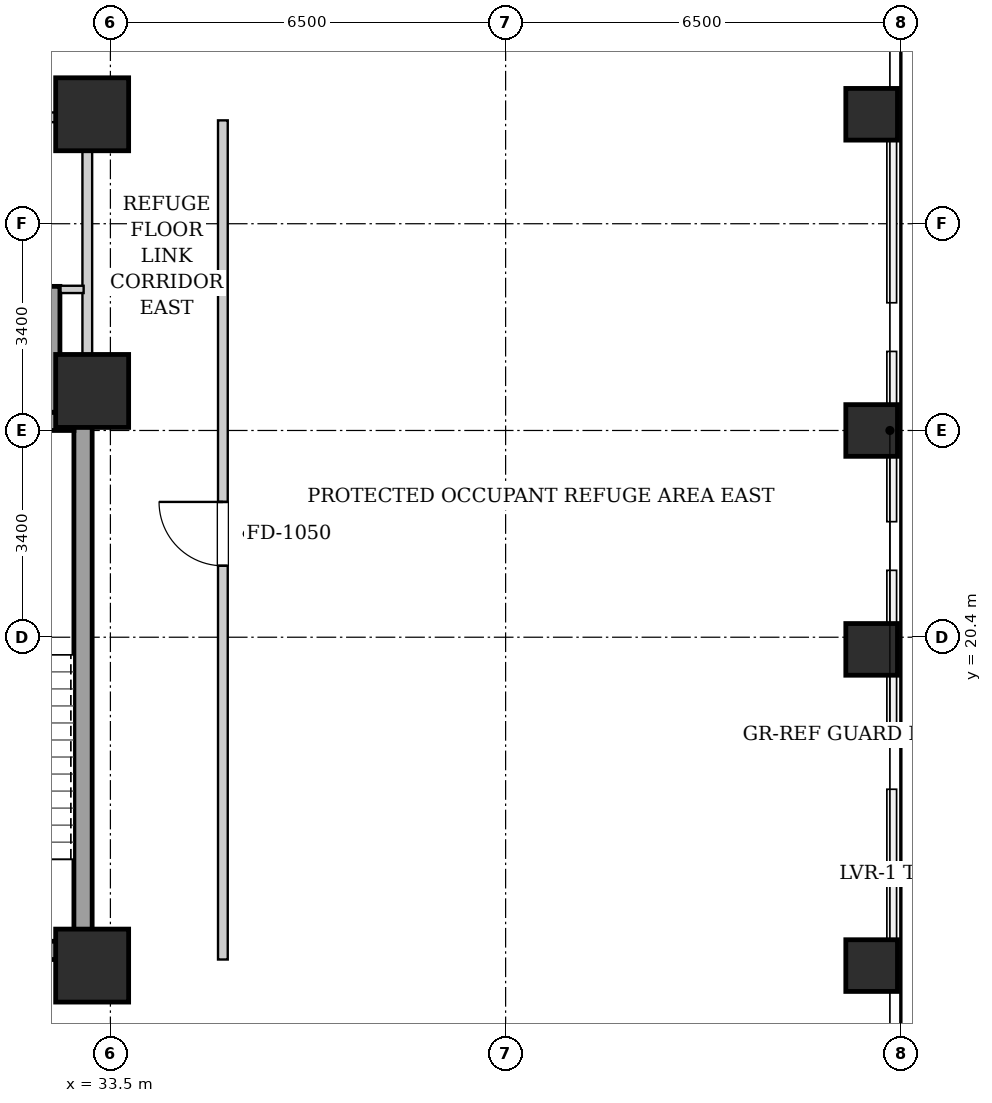
"""IFC4 building model, lengths in metres.
Left out: names, types, materials, properties, quantities, classifications, styles, units other than length and angle.
Written with IfcOpenShell. Run it as: python <this file> out.ifc"""

import sys

from ifc_helpers import new_model, si_unit, direction, frame, frame_2d, origin, origin_2d, place, context, subcontext, project, spatial, rectangle, extrude, element, fill, save


model = new_model("IFC4")
c1 = context("Model", 3, precision=1e-05, world=origin(), true_north=direction((0.0, 1.0)))
c2 = subcontext(c1, "Body", "Model", "MODEL_VIEW")
j1 = project(units=[si_unit("LENGTHUNIT", "METRE"), si_unit("PLANEANGLEUNIT", "RADIAN")], contexts=[c1])
p1 = place(None, origin())
s1 = spatial("IfcSite", under=j1, at=p1, CompositionType="ELEMENT")
p2 = place(p1, origin())
s2 = spatial("IfcBuilding", under=s1, at=p2, CompositionType="ELEMENT")
p3 = place(p2, frame((0.0, 0.0, 70.6)))
s3 = spatial("IfcBuildingStorey", under=s2, at=p3, CompositionType="ELEMENT", Elevation=70.6)
for number, where, z_axis, x_axis in (
    (1, (46.02, 15.0, 0.0), (0.0, 0.0, 1.0), (1.0, 0.0, 0.0)),
    (2, (46.02, 20.2, 0.0), (0.0, 0.0, 1.0), (1.0, 0.0, 0.0)),
    (3, (46.02, 23.8, 0.0), (0.0, 0.0, 1.0), (1.0, 0.0, 0.0)),
    (4, (46.02, 29.0, 0.0), (0.0, 0.0, 1.0), (1.0, 0.0, 0.0)),
):
    element("IfcColumn", number, at=place(p3, frame(where, z_axis=z_axis, x_axis=x_axis)), inside=s3, PredefinedType="COLUMN", context=c2, shape_type="SweptSolid", body=[
        extrude(rectangle(XDim=0.85, YDim=0.85, at=origin_2d()), origin(), (0.0, 0.0, 1.0), 4.5),
    ])
for number, where, z_axis, x_axis in (
    (5, (33.2, 15.0, 0.0), (0.0, 0.0, 1.0), (1.0, 0.0, 0.0)),
    (6, (33.2, 29.0, 0.0), (0.0, 0.0, 1.0), (1.0, 0.0, 0.0)),
    (7, (33.2, 24.45, 0.0), (0.0, 0.0, 1.0), (1.0, 0.0, 0.0)),
):
    element("IfcColumn", number, at=place(p3, frame(where, z_axis=z_axis, x_axis=x_axis)), inside=s3, PredefinedType="COLUMN", context=c2, shape_type="SweptSolid", body=[
        extrude(rectangle(XDim=1.2, YDim=1.2, at=origin_2d()), origin(), (0.0, 0.0, 1.0), 4.5),
    ])
p4 = place(p3, frame((33.05, 15.1, 0.0), z_axis=(0.0, 0.0, 1.0), x_axis=(0.0, 1.0, 0.0)))
e8 = element("IfcWall", 8, at=p4, inside=s3, PredefinedType="SHEAR", context=c2, shape_type="SweptSolid", body=[
    extrude(rectangle(XDim=9.0, YDim=0.3, at=frame_2d((4.5, 0.0))), origin(), (0.0, 0.0, 1.0), 4.24),
])
p5 = place(p3, frame((30.05, 23.95, 0.0), z_axis=(0.0, 0.0, 1.0), x_axis=(1.0, 0.0, 0.0)))
e9 = element("IfcWall", 9, at=p5, inside=s3, PredefinedType="SHEAR", context=c2, shape_type="SweptSolid", body=[
    extrude(rectangle(XDim=2.85, YDim=0.3, at=frame_2d((1.425, 0.0))), origin(), (0.0, 0.0, 1.0), 4.24),
])
p6 = place(p3, frame((30.05, 15.25, 0.0), z_axis=(0.0, 0.0, 1.0), x_axis=(1.0, 0.0, 0.0)))
e10 = element("IfcWall", 10, at=p6, inside=s3, PredefinedType="SHEAR", context=c2, shape_type="SweptSolid", body=[
    extrude(rectangle(XDim=2.85, YDim=0.3, at=frame_2d((1.425, 0.0))), origin(), (0.0, 0.0, 1.0), 4.24),
])
p7 = place(p6, frame((0.86, 0.0, 0.0)))
e11 = element("IfcOpeningElement", 11, at=p7, cuts=e10, PredefinedType="OPENING", context=c2, shape_type="SweptSolid", body=[
    extrude(rectangle(XDim=1.1, YDim=2.05, at=frame_2d((0.55, 1.025))), frame((0.0, 0.16, 0.0), z_axis=(0.0, -1.0, 0.0), x_axis=(1.0, 0.0, 0.0)), (0.0, 0.0, 1.0), 0.32),
])
p8 = place(p3, frame((32.56, 24.1, 0.0), z_axis=(0.0, 0.0, 1.0), x_axis=(0.0, 1.0, 0.0)))
e12 = element("IfcWall", 12, at=p8, inside=s3, PredefinedType="SHEAR", context=c2, shape_type="SweptSolid", body=[
    extrude(rectangle(XDim=2.07, YDim=0.22, at=frame_2d((1.035, 0.0))), origin(), (0.0, 0.0, 1.0), 4.24),
])
p9 = place(p3, frame((33.12, 24.12, 0.0), z_axis=(0.0, 0.0, 1.0), x_axis=(0.0, 1.0, 0.0)))
e13 = element("IfcWall", 13, at=p9, inside=s3, PredefinedType="PARTITIONING", context=c2, shape_type="SweptSolid", body=[
    extrude(rectangle(XDim=4.76, YDim=0.16, at=frame_2d((2.38, 0.0))), origin(), (0.0, 0.0, 1.0), 4.24),
])
p10 = place(p3, frame((32.68, 26.12, 0.0), z_axis=(0.0, 0.0, 1.0), x_axis=(1.0, 0.0, 0.0)))
e14 = element("IfcWall", 14, at=p10, inside=s3, PredefinedType="PARTITIONING", context=c2, shape_type="SweptSolid", body=[
    extrude(rectangle(XDim=0.38, YDim=0.12, at=frame_2d((0.19, 0.0))), origin(), (0.0, 0.0, 1.0), 4.24),
])
p11 = place(p3, frame((30.08, 28.95, 0.0), z_axis=(0.0, 0.0, 1.0), x_axis=(1.0, 0.0, 0.0)))
e15 = element("IfcWall", 15, at=p11, inside=s3, PredefinedType="PARTITIONING", context=c2, shape_type="SweptSolid", body=[
    extrude(rectangle(XDim=2.96, YDim=0.16, at=frame_2d((1.48, 0.0))), origin(), (0.0, 0.0, 1.0), 4.24),
])
p12 = place(p11, frame((1.045, 0.0, 0.0)))
e16 = element("IfcOpeningElement", 16, at=p12, cuts=e15, PredefinedType="OPENING", context=c2, shape_type="SweptSolid", body=[
    extrude(rectangle(XDim=0.86, YDim=2.05, at=frame_2d((0.43, 1.025))), frame((0.0, 0.09, 0.0), z_axis=(0.0, -1.0, 0.0), x_axis=(1.0, 0.0, 0.0)), (0.0, 0.0, 1.0), 0.18),
])
p13 = place(p3, frame((35.35, 15.1, 0.0), z_axis=(0.0, 0.0, 1.0), x_axis=(0.0, 1.0, 0.0)))
e17 = element("IfcWall", 17, at=p13, inside=s3, PredefinedType="PARTITIONING", context=c2, shape_type="SweptSolid", body=[
    extrude(rectangle(XDim=13.8, YDim=0.16, at=frame_2d((6.9, 0.0))), origin(), (0.0, 0.0, 1.0), 4.24),
])
p14 = place(p13, frame((6.475, 0.0, 0.0)))
e18 = element("IfcOpeningElement", 18, at=p14, cuts=e17, PredefinedType="OPENING", context=c2, shape_type="SweptSolid", body=[
    extrude(rectangle(XDim=1.05, YDim=2.05, at=frame_2d((0.525, 1.025))), frame((0.0, 0.09, 0.0), z_axis=(0.0, -1.0, 0.0), x_axis=(1.0, 0.0, 0.0)), (0.0, 0.0, 1.0), 0.18),
])
p15 = place(p14, origin())
e19 = element("IfcDoor", 19, at=p15, inside=s3, OperationType="SINGLE_SWING_RIGHT", PredefinedType="DOOR", context=c2, shape_type="SweptSolid", body=[
    extrude(rectangle(XDim=1.05, YDim=2.05, at=frame_2d((0.525, 1.025))), frame((0.0, 0.025, 0.0), z_axis=(0.0, -1.0, 0.0), x_axis=(1.0, 0.0, 0.0)), (0.0, 0.0, 1.0), 0.05),
])
fill(e18, e19)
save(model, sys.argv[1])
